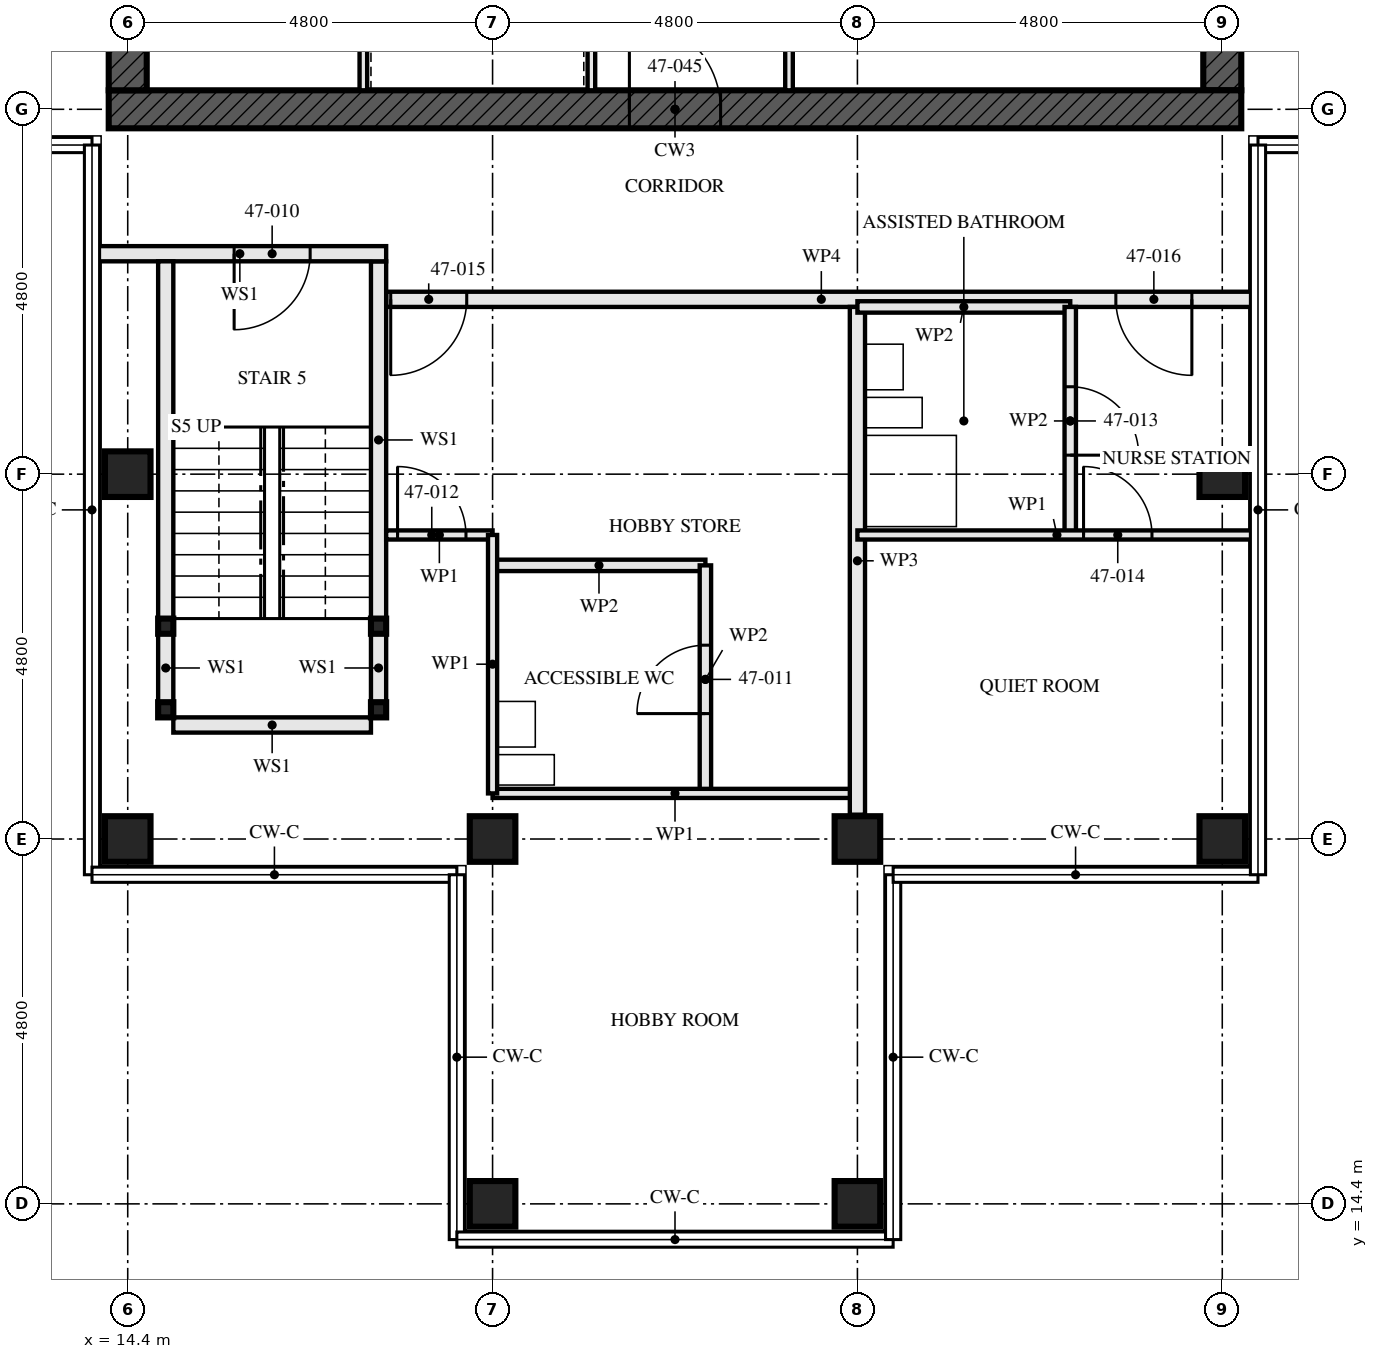
"""IFC4 building model, lengths in metres.
Left out: names, types, materials, properties, quantities, classifications, styles, units other than length and angle.
Written with IfcOpenShell. Run it as: python <this file> out.ifc"""

import sys

from ifc_helpers import new_model, si_unit, direction, frame, frame_2d, origin, origin_2d, place, context, subcontext, project, spatial, rectangle, hollow_rectangle, extrude, element, fill, save


model = new_model("IFC4")
c1 = context("Model", 3, precision=1e-05, world=origin(), true_north=direction((0.0, 1.0)))
c2 = subcontext(c1, "Body", "Model", "MODEL_VIEW")
j1 = project(units=[si_unit("LENGTHUNIT", "METRE"), si_unit("PLANEANGLEUNIT", "RADIAN")], contexts=[c1])
p1 = place(None, origin())
s1 = spatial("IfcSite", under=j1, at=p1, CompositionType="ELEMENT")
p2 = place(p1, origin())
s2 = spatial("IfcBuilding", under=s1, at=p2, CompositionType="ELEMENT")
p3 = place(p2, frame((0.0, 0.0, 172.5)))
s3 = spatial("IfcBuildingStorey", under=s2, at=p3, CompositionType="ELEMENT", Elevation=172.5)
for number, where, z_axis, x_axis in (
    (1, (14.4, 19.2, 0.0), (0.0, 0.0, 1.0), (0.0, 1.0, 0.0)),
    (2, (14.4, 24.0, 0.0), (0.0, 0.0, 1.0), (1.0, 0.0, 0.0)),
    (3, (19.2, 14.4, 0.0), (0.0, 0.0, 1.0), (0.0, 1.0, 0.0)),
    (4, (19.2, 19.2, 0.0), (0.0, 0.0, 1.0), (0.0, 1.0, 0.0)),
    (5, (24.0, 14.4, 0.0), (0.0, 0.0, 1.0), (0.0, 1.0, 0.0)),
    (6, (24.0, 19.2, 0.0), (0.0, 0.0, 1.0), (0.0, 1.0, 0.0)),
    (7, (28.8, 19.2, 0.0), (0.0, 0.0, 1.0), (0.0, 1.0, 0.0)),
    (8, (28.8, 24.0, 0.0), (0.0, 0.0, 1.0), (1.0, 0.0, 0.0)),
):
    element("IfcColumn", number, at=place(p3, frame(where, z_axis=z_axis, x_axis=x_axis)), inside=s3, PredefinedType="COLUMN", context=c2, shape_type="SweptSolid", body=[
        extrude(hollow_rectangle(XDim=0.6, YDim=0.6, WallThickness=0.08, at=origin_2d()), origin(), (0.0, 0.0, 1.0), 3.5),
    ])
p4 = place(p3, frame((14.15, 28.8, -0.17), z_axis=(0.0, 0.0, 1.0), x_axis=(1.0, 0.0, 0.0)))
e9 = element("IfcWall", 9, at=p4, inside=s3, PredefinedType="SHEAR", context=c2, shape_type="SweptSolid", body=[
    extrude(rectangle(XDim=14.9, YDim=0.5, at=frame_2d((7.45, 0.0))), origin(), (0.0, 0.0, 1.0), 3.5),
])
p5 = place(p4, frame((6.85, 0.0, 0.17)))
e10 = element("IfcOpeningElement", 10, at=p5, cuts=e9, PredefinedType="OPENING", context=c2, shape_type="SweptSolid", body=[
    extrude(rectangle(XDim=1.2, YDim=2.1, at=frame_2d((0.6, 1.05))), frame((0.0, 0.26, 0.0), z_axis=(0.0, -1.0, 0.0), x_axis=(1.0, 0.0, 0.0)), (0.0, 0.0, 1.0), 0.521),
])
p6 = place(p3, frame((14.4, 42.95, -0.17), z_axis=(0.0, 0.0, 1.0), x_axis=(0.0, -1.0, 0.0)))
e11 = element("IfcWall", 11, at=p6, inside=s3, PredefinedType="SHEAR", context=c2, shape_type="SweptSolid", body=[
    extrude(rectangle(XDim=13.9, YDim=0.5, at=frame_2d((6.95, 0.0))), origin(), (0.0, 0.0, 1.0), 3.5),
])
p7 = place(p6, frame((6.35, 0.0, 0.17)))
e12 = element("IfcOpeningElement", 12, at=p7, cuts=e11, PredefinedType="OPENING", context=c2, shape_type="SweptSolid", body=[
    extrude(rectangle(XDim=1.2, YDim=2.1, at=frame_2d((0.6, 1.05))), frame((0.0, 0.26, 0.0), z_axis=(0.0, -1.0, 0.0), x_axis=(1.0, 0.0, 0.0)), (0.0, 0.0, 1.0), 0.521),
])
p8 = place(p3, frame((28.8, 29.05, -0.17), z_axis=(0.0, 0.0, 1.0), x_axis=(0.0, 1.0, 0.0)))
e13 = element("IfcWall", 13, at=p8, inside=s3, PredefinedType="SHEAR", context=c2, shape_type="SweptSolid", body=[
    extrude(rectangle(XDim=13.9, YDim=0.5, at=frame_2d((6.95, 0.0))), origin(), (0.0, 0.0, 1.0), 3.5),
])
p9 = place(p8, frame((6.35, 0.0, 0.17)))
e14 = element("IfcOpeningElement", 14, at=p9, cuts=e13, PredefinedType="OPENING", context=c2, shape_type="SweptSolid", body=[
    extrude(rectangle(XDim=1.2, YDim=2.1, at=frame_2d((0.6, 1.05))), frame((0.0, 0.26, 0.0), z_axis=(0.0, -1.0, 0.0), x_axis=(1.0, 0.0, 0.0)), (0.0, 0.0, 1.0), 0.521),
])
for number, where, z_axis, x_axis in (
    (15, (14.9, 20.9, 0.0), (0.0, 0.0, 1.0), (1.0, 0.0, 0.0)),
    (16, (17.7, 20.9, 0.0), (0.0, 0.0, 1.0), (1.0, 0.0, 0.0)),
    (17, (14.9, 22.0, 0.0), (0.0, 0.0, 1.0), (1.0, 0.0, 0.0)),
    (18, (17.7, 22.0, 0.0), (0.0, 0.0, 1.0), (1.0, 0.0, 0.0)),
):
    element("IfcColumn", number, at=place(p3, frame(where, z_axis=z_axis, x_axis=x_axis)), inside=s3, PredefinedType="COLUMN", context=c2, shape_type="SweptSolid", body=[
        extrude(hollow_rectangle(XDim=0.2, YDim=0.2, WallThickness=0.008, at=origin_2d()), origin(), (0.0, 0.0, 1.0), 3.33),
    ])
p10 = place(p3, frame((14.9, 21.0, 0.0), z_axis=(0.0, 0.0, 1.0), x_axis=(0.0, 1.0, 0.0)))
e19 = element("IfcWall", 19, at=p10, inside=s3, PredefinedType="SOLIDWALL", context=c2, shape_type="SweptSolid", body=[
    extrude(rectangle(XDim=0.9, YDim=0.2, at=frame_2d((0.45, 0.0))), origin(), (0.0, 0.0, 1.0), 2.99),
])
p11 = place(p3, frame((14.9, 22.1, 0.0), z_axis=(0.0, 0.0, 1.0), x_axis=(0.0, 1.0, 0.0)))
e20 = element("IfcWall", 20, at=p11, inside=s3, PredefinedType="SOLIDWALL", context=c2, shape_type="SweptSolid", body=[
    extrude(rectangle(XDim=4.7, YDim=0.2, at=frame_2d((2.35, 0.0))), origin(), (0.0, 0.0, 1.0), 2.99),
])
p12 = place(p3, frame((17.7, 21.0, 0.0), z_axis=(0.0, 0.0, 1.0), x_axis=(0.0, 1.0, 0.0)))
e21 = element("IfcWall", 21, at=p12, inside=s3, PredefinedType="SOLIDWALL", context=c2, shape_type="SweptSolid", body=[
    extrude(rectangle(XDim=0.9, YDim=0.2, at=frame_2d((0.45, 0.0))), origin(), (0.0, 0.0, 1.0), 2.99),
])
p13 = place(p3, frame((17.7, 22.1, 0.0), z_axis=(0.0, 0.0, 1.0), x_axis=(0.0, 1.0, 0.0)))
e22 = element("IfcWall", 22, at=p13, inside=s3, PredefinedType="SOLIDWALL", context=c2, shape_type="SweptSolid", body=[
    extrude(rectangle(XDim=4.7, YDim=0.2, at=frame_2d((2.35, 0.0))), origin(), (0.0, 0.0, 1.0), 2.99),
])
p14 = place(p3, frame((15.0, 20.7, 0.0), z_axis=(0.0, 0.0, 1.0), x_axis=(1.0, 0.0, 0.0)))
e23 = element("IfcWall", 23, at=p14, inside=s3, PredefinedType="SOLIDWALL", context=c2, shape_type="SweptSolid", body=[
    extrude(rectangle(XDim=2.6, YDim=0.2, at=frame_2d((1.3, 0.0))), origin(), (0.0, 0.0, 1.0), 3.33),
])
p15 = place(p3, frame((13.95, 26.9, 0.0), z_axis=(0.0, 0.0, 1.0), x_axis=(1.0, 0.0, 0.0)))
e24 = element("IfcWall", 24, at=p15, inside=s3, PredefinedType="SOLIDWALL", context=c2, shape_type="SweptSolid", body=[
    extrude(rectangle(XDim=3.85, YDim=0.2, at=frame_2d((1.925, 0.0))), origin(), (0.0, 0.0, 1.0), 2.32),
])
p16 = place(p15, frame((1.85, 0.0, 0.0)))
e25 = element("IfcOpeningElement", 25, at=p16, cuts=e24, PredefinedType="OPENING", context=c2, shape_type="SweptSolid", body=[
    extrude(rectangle(XDim=1.0, YDim=2.1, at=frame_2d((0.5, 1.05))), frame((0.0, 0.111, 0.0), z_axis=(0.0, -1.0, 0.0), x_axis=(1.0, 0.0, 0.0)), (0.0, 0.0, 1.0), 0.221),
])
p17 = place(p3, frame((22.0, 19.8, 0.0), z_axis=(0.0, 0.0, 1.0), x_axis=(0.0, 1.0, 0.0)))
e26 = element("IfcWall", 26, at=p17, inside=s3, PredefinedType="PARTITIONING", context=c2, shape_type="SweptSolid", body=[
    extrude(rectangle(XDim=3.0, YDim=0.15, at=frame_2d((1.5, 0.0))), origin(), (0.0, 0.0, 1.0), 3.33),
])
p18 = place(p17, frame((1.05, 0.0, 0.0)))
e27 = element("IfcOpeningElement", 27, at=p18, cuts=e26, PredefinedType="OPENING", context=c2, shape_type="SweptSolid", body=[
    extrude(rectangle(XDim=0.9, YDim=2.1, at=frame_2d((0.45, 1.05))), frame((0.0, 0.085, 0.0), z_axis=(0.0, -1.0, 0.0), x_axis=(1.0, 0.0, 0.0)), (0.0, 0.0, 1.0), 0.171),
])
p19 = place(p3, frame((19.2, 22.8, 0.0), z_axis=(0.0, 0.0, 1.0), x_axis=(1.0, 0.0, 0.0)))
e28 = element("IfcWall", 28, at=p19, inside=s3, PredefinedType="PARTITIONING", context=c2, shape_type="SweptSolid", body=[
    extrude(rectangle(XDim=2.8, YDim=0.15, at=frame_2d((1.4, 0.0))), origin(), (0.0, 0.0, 1.0), 3.33),
])
p20 = place(p3, frame((17.8, 23.2, 0.0), z_axis=(0.0, 0.0, 1.0), x_axis=(1.0, 0.0, 0.0)))
e29 = element("IfcWall", 29, at=p20, inside=s3, PredefinedType="PARTITIONING", context=c2, shape_type="SweptSolid", body=[
    extrude(rectangle(XDim=1.4, YDim=0.12, at=frame_2d((0.7, 0.0))), origin(), (0.0, 0.0, 1.0), 3.33),
])
p21 = place(p20, frame((0.15, 0.0, 0.0)))
e30 = element("IfcOpeningElement", 30, at=p21, cuts=e29, PredefinedType="OPENING", context=c2, shape_type="SweptSolid", body=[
    extrude(rectangle(XDim=0.9, YDim=2.1, at=frame_2d((0.45, 1.05))), frame((0.0, 0.071, 0.0), z_axis=(0.0, -1.0, 0.0), x_axis=(1.0, 0.0, 0.0)), (0.0, 0.0, 1.0), 0.141),
])
p22 = place(p3, frame((19.2, 19.8, 0.0), z_axis=(0.0, 0.0, 1.0), x_axis=(1.0, 0.0, 0.0)))
e31 = element("IfcWall", 31, at=p22, inside=s3, PredefinedType="PARTITIONING", context=c2, shape_type="SweptSolid", body=[
    extrude(rectangle(XDim=4.8, YDim=0.12, at=frame_2d((2.4, 0.0))), origin(), (0.0, 0.0, 1.0), 3.33),
])
p23 = place(p3, frame((19.2, 19.8, 0.0), z_axis=(0.0, 0.0, 1.0), x_axis=(0.0, 1.0, 0.0)))
e32 = element("IfcWall", 32, at=p23, inside=s3, PredefinedType="PARTITIONING", context=c2, shape_type="SweptSolid", body=[
    extrude(rectangle(XDim=3.4, YDim=0.12, at=frame_2d((1.7, 0.0))), origin(), (0.0, 0.0, 1.0), 2.55),
])
p24 = place(p3, frame((24.0, 19.52, 0.0), z_axis=(0.0, 0.0, 1.0), x_axis=(0.0, 1.0, 0.0)))
e33 = element("IfcWall", 33, at=p24, inside=s3, PredefinedType="PARTITIONING", context=c2, shape_type="SweptSolid", body=[
    extrude(rectangle(XDim=6.68, YDim=0.2, at=frame_2d((3.34, 0.0))), origin(), (0.0, 0.0, 1.0), 2.55),
])
p25 = place(p3, frame((26.8, 23.2, 0.0), z_axis=(0.0, 0.0, 1.0), x_axis=(0.0, 1.0, 0.0)))
e34 = element("IfcWall", 34, at=p25, inside=s3, PredefinedType="PARTITIONING", context=c2, shape_type="SweptSolid", body=[
    extrude(rectangle(XDim=3.0, YDim=0.15, at=frame_2d((1.5, 0.0))), origin(), (0.0, 0.0, 1.0), 2.55),
])
p26 = place(p25, frame((1.05, 0.0, 0.0)))
e35 = element("IfcOpeningElement", 35, at=p26, cuts=e34, PredefinedType="OPENING", context=c2, shape_type="SweptSolid", body=[
    extrude(rectangle(XDim=0.9, YDim=2.1, at=frame_2d((0.45, 1.05))), frame((0.0, 0.085, 0.0), z_axis=(0.0, -1.0, 0.0), x_axis=(1.0, 0.0, 0.0)), (0.0, 0.0, 1.0), 0.171),
])
p27 = place(p3, frame((24.0, 26.2, 0.0), z_axis=(0.0, 0.0, 1.0), x_axis=(1.0, 0.0, 0.0)))
e36 = element("IfcWall", 36, at=p27, inside=s3, PredefinedType="PARTITIONING", context=c2, shape_type="SweptSolid", body=[
    extrude(rectangle(XDim=2.8, YDim=0.15, at=frame_2d((1.4, 0.0))), origin(), (0.0, 0.0, 1.0), 3.33),
])
p28 = place(p3, frame((24.0, 23.2, 0.0), z_axis=(0.0, 0.0, 1.0), x_axis=(1.0, 0.0, 0.0)))
e37 = element("IfcWall", 37, at=p28, inside=s3, PredefinedType="PARTITIONING", context=c2, shape_type="SweptSolid", body=[
    extrude(rectangle(XDim=5.25, YDim=0.12, at=frame_2d((2.625, 0.0))), origin(), (0.0, 0.0, 1.0), 2.32),
])
p29 = place(p28, frame((2.975, 0.0, 0.0)))
e38 = element("IfcOpeningElement", 38, at=p29, cuts=e37, PredefinedType="OPENING", context=c2, shape_type="SweptSolid", body=[
    extrude(rectangle(XDim=0.9, YDim=2.1, at=frame_2d((0.45, 1.05))), frame((0.0, 0.071, 0.0), z_axis=(0.0, -1.0, 0.0), x_axis=(1.0, 0.0, 0.0)), (0.0, 0.0, 1.0), 0.141),
])
p30 = place(p3, frame((17.8, 26.3, 0.0), z_axis=(0.0, 0.0, 1.0), x_axis=(1.0, 0.0, 0.0)))
e39 = element("IfcWall", 39, at=p30, inside=s3, PredefinedType="PARTITIONING", context=c2, shape_type="SweptSolid", body=[
    extrude(rectangle(XDim=11.45, YDim=0.2, at=frame_2d((5.725, 0.0))), origin(), (0.0, 0.0, 1.0), 2.32),
])
p31 = place(p30, frame((0.06, 0.0, 0.0)))
e40 = element("IfcOpeningElement", 40, at=p31, cuts=e39, PredefinedType="OPENING", context=c2, shape_type="SweptSolid", body=[
    extrude(rectangle(XDim=1.0, YDim=2.1, at=frame_2d((0.5, 1.05))), frame((0.0, 0.111, 0.0), z_axis=(0.0, -1.0, 0.0), x_axis=(1.0, 0.0, 0.0)), (0.0, 0.0, 1.0), 0.221),
])
p32 = place(p30, frame((9.6, 0.0, 0.0)))
e41 = element("IfcOpeningElement", 41, at=p32, cuts=e39, PredefinedType="OPENING", context=c2, shape_type="SweptSolid", body=[
    extrude(rectangle(XDim=1.0, YDim=2.1, at=frame_2d((0.5, 1.05))), frame((0.0, 0.111, 0.0), z_axis=(0.0, -1.0, 0.0), x_axis=(1.0, 0.0, 0.0)), (0.0, 0.0, 1.0), 0.221),
])
p33 = place(p3, frame((20.5, 29.05, 0.0), z_axis=(0.0, 0.0, 1.0), x_axis=(0.0, 1.0, 0.0)))
e42 = element("IfcWall", 42, at=p33, inside=s3, PredefinedType="SOLIDWALL", context=c2, shape_type="SweptSolid", body=[
    extrude(rectangle(XDim=5.8, YDim=0.1, at=frame_2d((2.9, 0.0))), origin(), (0.0, 0.0, 1.0), 3.33),
])
p34 = place(p33, frame((0.8, 0.0, 0.0)))
e43 = element("IfcOpeningElement", 43, at=p34, cuts=e42, PredefinedType="OPENING", context=c2, shape_type="SweptSolid", body=[
    extrude(rectangle(XDim=1.1, YDim=2.3, at=frame_2d((0.55, 1.15))), frame((0.0, 0.061, 0.0), z_axis=(0.0, -1.0, 0.0), x_axis=(1.0, 0.0, 0.0)), (0.0, 0.0, 1.0), 0.121),
])
p35 = place(p33, frame((3.775, 0.0, 0.0)))
e44 = element("IfcOpeningElement", 44, at=p35, cuts=e42, PredefinedType="OPENING", context=c2, shape_type="SweptSolid", body=[
    extrude(rectangle(XDim=1.1, YDim=2.3, at=frame_2d((0.55, 1.15))), frame((0.0, 0.061, 0.0), z_axis=(0.0, -1.0, 0.0), x_axis=(1.0, 0.0, 0.0)), (0.0, 0.0, 1.0), 0.121),
])
p36 = place(p3, frame((23.1, 29.05, 0.0), z_axis=(0.0, 0.0, 1.0), x_axis=(0.0, 1.0, 0.0)))
e45 = element("IfcWall", 45, at=p36, inside=s3, PredefinedType="SOLIDWALL", context=c2, shape_type="SweptSolid", body=[
    extrude(rectangle(XDim=5.8, YDim=0.1, at=frame_2d((2.9, 0.0))), origin(), (0.0, 0.0, 1.0), 3.33),
])
p37 = place(p36, frame((1.0, 0.0, 0.0)))
e46 = element("IfcOpeningElement", 46, at=p37, cuts=e45, PredefinedType="OPENING", context=c2, shape_type="SweptSolid", body=[
    extrude(rectangle(XDim=0.7, YDim=2.1, at=frame_2d((0.35, 1.05))), frame((0.0, 0.061, 0.0), z_axis=(0.0, -1.0, 0.0), x_axis=(1.0, 0.0, 0.0)), (0.0, 0.0, 1.0), 0.121),
])
p38 = place(p3, frame((17.5, 29.05, 0.0), z_axis=(0.0, 0.0, 1.0), x_axis=(0.0, 1.0, 0.0)))
e47 = element("IfcWall", 47, at=p38, inside=s3, PredefinedType="SOLIDWALL", context=c2, shape_type="SweptSolid", body=[
    extrude(rectangle(XDim=5.8, YDim=0.1, at=frame_2d((2.9, 0.0))), origin(), (0.0, 0.0, 1.0), 3.33),
])
p39 = place(p16, frame((1.0, 0.0, 0.0), z_axis=(0.0, 0.0, 1.0), x_axis=(-1.0, 0.0, 0.0)))
e48 = element("IfcDoor", 48, at=p39, inside=s3, OperationType="SINGLE_SWING_LEFT", PredefinedType="DOOR", context=c2, shape_type="SweptSolid", body=[
    extrude(rectangle(XDim=1.0, YDim=2.1, at=frame_2d((0.5, 1.05))), frame((0.0, 0.032, 0.0), z_axis=(0.0, -1.0, 0.0), x_axis=(1.0, 0.0, 0.0)), (0.0, 0.0, 1.0), 0.064),
])
fill(e25, e48)
p40 = place(p18, origin())
e49 = element("IfcDoor", 49, at=p40, inside=s3, OperationType="SINGLE_SWING_RIGHT", PredefinedType="DOOR", context=c2, shape_type="SweptSolid", body=[
    extrude(rectangle(XDim=0.9, YDim=2.1, at=frame_2d((0.45, 1.05))), frame((0.0, 0.022, 0.0), z_axis=(0.0, -1.0, 0.0), x_axis=(1.0, 0.0, 0.0)), (0.0, 0.0, 1.0), 0.044),
])
fill(e27, e49)
p41 = place(p21, origin())
e50 = element("IfcDoor", 50, at=p41, inside=s3, OperationType="SINGLE_SWING_RIGHT", PredefinedType="DOOR", context=c2, shape_type="SweptSolid", body=[
    extrude(rectangle(XDim=0.9, YDim=2.1, at=frame_2d((0.45, 1.05))), frame((0.0, 0.022, 0.0), z_axis=(0.0, -1.0, 0.0), x_axis=(1.0, 0.0, 0.0)), (0.0, 0.0, 1.0), 0.044),
])
fill(e30, e50)
p42 = place(p26, frame((0.9, 0.0, 0.0), z_axis=(0.0, 0.0, 1.0), x_axis=(-1.0, 0.0, 0.0)))
e51 = element("IfcDoor", 51, at=p42, inside=s3, OperationType="SINGLE_SWING_LEFT", PredefinedType="DOOR", context=c2, shape_type="SweptSolid", body=[
    extrude(rectangle(XDim=0.9, YDim=2.1, at=frame_2d((0.45, 1.05))), frame((0.0, 0.022, 0.0), z_axis=(0.0, -1.0, 0.0), x_axis=(1.0, 0.0, 0.0)), (0.0, 0.0, 1.0), 0.044),
])
fill(e35, e51)
p43 = place(p29, origin())
e52 = element("IfcDoor", 52, at=p43, inside=s3, OperationType="SINGLE_SWING_RIGHT", PredefinedType="DOOR", context=c2, shape_type="SweptSolid", body=[
    extrude(rectangle(XDim=0.9, YDim=2.1, at=frame_2d((0.45, 1.05))), frame((0.0, 0.022, 0.0), z_axis=(0.0, -1.0, 0.0), x_axis=(1.0, 0.0, 0.0)), (0.0, 0.0, 1.0), 0.044),
])
fill(e38, e52)
p44 = place(p31, frame((1.0, 0.0, 0.0), z_axis=(0.0, 0.0, 1.0), x_axis=(-1.0, 0.0, 0.0)))
e53 = element("IfcDoor", 53, at=p44, inside=s3, OperationType="SINGLE_SWING_LEFT", PredefinedType="DOOR", context=c2, shape_type="SweptSolid", body=[
    extrude(rectangle(XDim=1.0, YDim=2.1, at=frame_2d((0.5, 1.05))), frame((0.0, 0.027, 0.0), z_axis=(0.0, -1.0, 0.0), x_axis=(1.0, 0.0, 0.0)), (0.0, 0.0, 1.0), 0.054),
])
fill(e40, e53)
p45 = place(p32, frame((1.0, 0.0, 0.0), z_axis=(0.0, 0.0, 1.0), x_axis=(-1.0, 0.0, 0.0)))
e54 = element("IfcDoor", 54, at=p45, inside=s3, OperationType="SINGLE_SWING_RIGHT", PredefinedType="DOOR", context=c2, shape_type="SweptSolid", body=[
    extrude(rectangle(XDim=1.0, YDim=2.1, at=frame_2d((0.5, 1.05))), frame((0.0, 0.027, 0.0), z_axis=(0.0, -1.0, 0.0), x_axis=(1.0, 0.0, 0.0)), (0.0, 0.0, 1.0), 0.054),
])
fill(e41, e54)
p46 = place(p5, origin())
e55 = element("IfcDoor", 55, at=p46, inside=s3, OperationType="SINGLE_SWING_LEFT", PredefinedType="DOOR", context=c2, shape_type="SweptSolid", body=[
    extrude(rectangle(XDim=1.2, YDim=2.1, at=frame_2d((0.6, 1.05))), frame((0.0, 0.027, 0.0), z_axis=(0.0, -1.0, 0.0), x_axis=(1.0, 0.0, 0.0)), (0.0, 0.0, 1.0), 0.054),
])
fill(e10, e55)
save(model, sys.argv[1])
